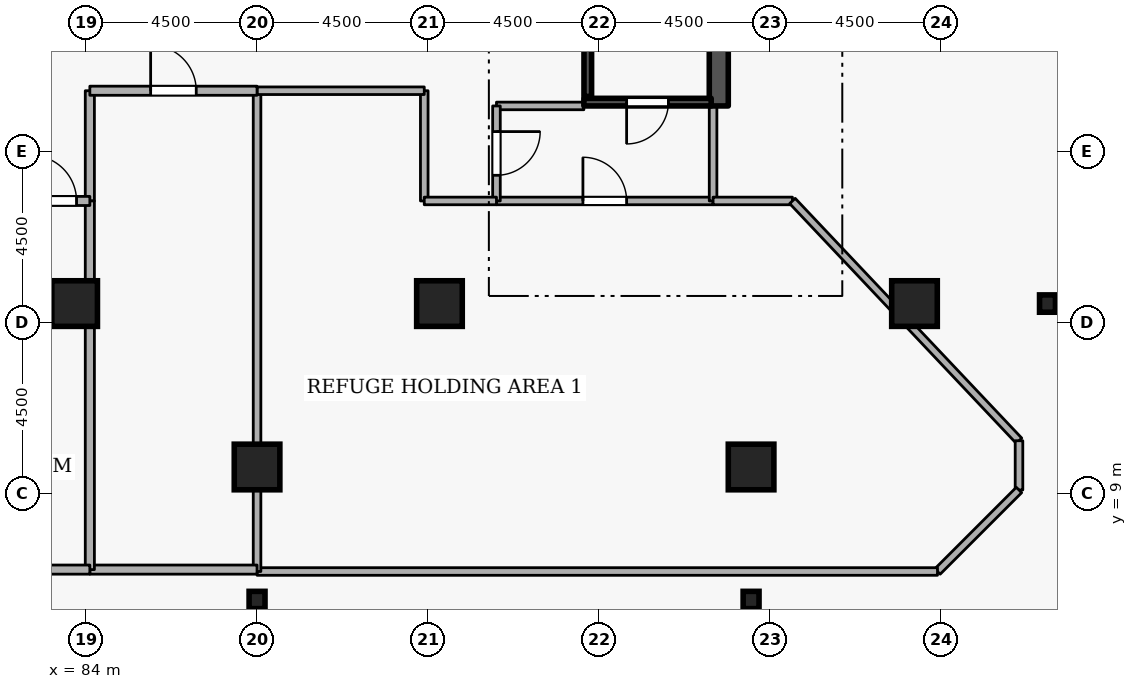
"""IFC4 building model, lengths in metres.
Left out: names, types, materials, properties, quantities, classifications, styles, units other than length and angle.
Written with IfcOpenShell. Run it as: python <this file> out.ifc"""

import sys

from ifc_helpers import new_model, si_unit, direction, frame, frame_2d, origin, origin_2d, place, context, subcontext, project, spatial, rectangle, i_section, extrude, element, fill, save


model = new_model("IFC4")
c1 = context("Model", 3, precision=1e-05, world=origin(), true_north=direction((0.0, 1.0)))
c2 = subcontext(c1, "Body", "Model", "MODEL_VIEW")
j1 = project(units=[si_unit("LENGTHUNIT", "METRE"), si_unit("PLANEANGLEUNIT", "RADIAN")], contexts=[c1])
p1 = place(None, origin())
s1 = spatial("IfcSite", under=j1, at=p1, CompositionType="ELEMENT")
p2 = place(p1, origin())
s2 = spatial("IfcBuilding", under=s1, at=p2, CompositionType="ELEMENT")
p3 = place(p2, frame((0.0, 0.0, 141.3)))
s3 = spatial("IfcBuildingStorey", under=s2, at=p3, CompositionType="ELEMENT", Elevation=141.3)
p4 = place(p3, frame((100.65, 19.2, 0.0), z_axis=(0.0, 0.0, 1.0), x_axis=(0.0, 1.0, 0.0)))
e1 = element("IfcWall", 1, at=p4, inside=s3, PredefinedType="SHEAR", context=c2, shape_type="SweptSolid", body=[
    extrude(rectangle(XDim=15.6, YDim=0.5, at=frame_2d((7.8, 0.0))), origin(), (0.0, 0.0, 1.0), 4.2),
])
for number, where, z_axis, x_axis in (
    (2, (105.8, 14.0, 0.0), (0.0, 0.0, 1.0), (1.0, 0.0, 0.0)),
    (3, (101.5, 9.7, 0.0), (0.0, 0.0, 1.0), (1.0, 0.0, 0.0)),
    (4, (88.5, 9.7, 0.0), (0.0, 0.0, 1.0), (1.0, 0.0, 0.0)),
    (5, (93.3, 14.0, 0.0), (0.0, 0.0, 1.0), (1.0, 0.0, 0.0)),
    (6, (83.7, 14.0, 0.0), (0.0, 0.0, 1.0), (1.0, 0.0, 0.0)),
):
    element("IfcColumn", number, at=place(p3, frame(where, z_axis=z_axis, x_axis=x_axis)), inside=s3, PredefinedType="COLUMN", context=c2, shape_type="SweptSolid", body=[
        extrude(rectangle(XDim=1.2, YDim=1.2, at=origin_2d()), origin(), (0.0, 0.0, 1.0), 4.2),
    ])
for number, where, z_axis, x_axis in (
    (7, (109.3, 14.0, 0.0), (0.0, 0.0, 1.0), (1.0, 0.0, 0.0)),
    (8, (101.5, 6.2, 0.0), (0.0, 0.0, 1.0), (1.0, 0.0, 0.0)),
    (9, (88.5, 6.2, 0.0), (0.0, 0.0, 1.0), (1.0, 0.0, 0.0)),
):
    element("IfcColumn", number, at=place(p3, frame(where, z_axis=z_axis, x_axis=x_axis)), inside=s3, PredefinedType="COLUMN", context=c2, shape_type="SweptSolid", body=[
        extrude(i_section(OverallWidth=0.418, OverallDepth=0.456, WebThickness=0.042, FlangeThickness=0.067, FilletRadius=0.015, at=origin_2d()), origin(), (0.0, 0.0, 1.0), 4.2),
    ])
p5 = place(p3, frame((100.45, 19.3, 0.0), z_axis=(0.0, 0.0, 1.0), x_axis=(-1.0, 0.0, 0.0)))
e10 = element("IfcWall", 10, at=p5, inside=s3, PredefinedType="SHEAR", context=c2, shape_type="SweptSolid", body=[
    extrude(rectangle(XDim=3.35, YDim=0.2, at=frame_2d((1.675, 0.0))), origin(), (0.0, 0.0, 1.0), 4.2),
])
p6 = place(p5, frame((1.125, 0.0, 0.0)))
e11 = element("IfcOpeningElement", 11, at=p6, cuts=e10, PredefinedType="OPENING", context=c2, shape_type="SweptSolid", body=[
    extrude(rectangle(XDim=1.1, YDim=2.1, at=frame_2d((0.55, 1.05))), frame((0.0, 0.11, 0.0), z_axis=(0.0, -1.0, 0.0), x_axis=(1.0, 0.0, 0.0)), (0.0, 0.0, 1.0), 0.22),
])
p7 = place(p3, frame((97.203, 26.55, 0.0), z_axis=(0.0, 0.0, 1.0), x_axis=(0.0, -1.0, 0.0)))
e12 = element("IfcWall", 12, at=p7, inside=s3, PredefinedType="SHEAR", context=c2, shape_type="SweptSolid", body=[
    extrude(rectangle(XDim=7.1, YDim=0.2, at=frame_2d((3.55, 0.0))), origin(), (0.0, 0.0, 1.0), 4.2),
])
p8 = place(p3, frame((94.8, 16.7, 0.0), z_axis=(0.0, 0.0, 1.0), x_axis=(1.0, 0.0, 0.0)))
e13 = element("IfcWall", 13, at=p8, inside=s3, PredefinedType="STANDARD", context=c2, shape_type="SweptSolid", body=[
    extrude(rectangle(XDim=5.7, YDim=0.2, at=frame_2d((2.85, 0.0))), origin(), (0.0, 0.0, 1.0), 3.94),
])
p9 = place(p8, frame((2.275, 0.0, 0.0)))
e14 = element("IfcOpeningElement", 14, at=p9, cuts=e13, PredefinedType="OPENING", context=c2, shape_type="SweptSolid", body=[
    extrude(rectangle(XDim=1.15, YDim=2.1, at=frame_2d((0.575, 1.05))), frame((0.0, 0.11, 0.0), z_axis=(0.0, -1.0, 0.0), x_axis=(1.0, 0.0, 0.0)), (0.0, 0.0, 1.0), 0.22),
])
p10 = place(p3, frame((100.5, 16.7, 0.0), z_axis=(0.0, 0.0, 1.0), x_axis=(0.0, 1.0, 0.0)))
e15 = element("IfcWall", 15, at=p10, inside=s3, PredefinedType="STANDARD", context=c2, shape_type="SweptSolid", body=[
    extrude(rectangle(XDim=2.5, YDim=0.2, at=frame_2d((1.25, 0.0))), origin(), (0.0, 0.0, 1.0), 3.94),
])
p11 = place(p3, frame((97.1, 19.2, 0.0), z_axis=(0.0, 0.0, 1.0), x_axis=(-1.0, 0.0, 0.0)))
e16 = element("IfcWall", 16, at=p11, inside=s3, PredefinedType="STANDARD", context=c2, shape_type="SweptSolid", body=[
    extrude(rectangle(XDim=2.3, YDim=0.2, at=frame_2d((1.15, 0.0))), origin(), (0.0, 0.0, 1.0), 3.145),
])
p12 = place(p3, frame((94.8, 19.2, 0.0), z_axis=(0.0, 0.0, 1.0), x_axis=(0.0, -1.0, 0.0)))
e17 = element("IfcWall", 17, at=p12, inside=s3, PredefinedType="STANDARD", context=c2, shape_type="SweptSolid", body=[
    extrude(rectangle(XDim=2.5, YDim=0.2, at=frame_2d((1.25, 0.0))), origin(), (0.0, 0.0, 1.0), 3.94),
])
p13 = place(p12, frame((0.675, 0.0, 0.0)))
e18 = element("IfcOpeningElement", 18, at=p13, cuts=e17, PredefinedType="OPENING", context=c2, shape_type="SweptSolid", body=[
    extrude(rectangle(XDim=1.15, YDim=2.1, at=frame_2d((0.575, 1.05))), frame((0.0, 0.11, 0.0), z_axis=(0.0, -1.0, 0.0), x_axis=(1.0, 0.0, 0.0)), (0.0, 0.0, 1.0), 0.22),
])
p14 = place(p3, frame((92.9, 19.6, 0.0), z_axis=(0.0, 0.0, 1.0), x_axis=(0.0, -1.0, 0.0)))
e19 = element("IfcWall", 19, at=p14, inside=s3, PredefinedType="STANDARD", context=c2, shape_type="SweptSolid", body=[
    extrude(rectangle(XDim=2.9, YDim=0.2, at=frame_2d((1.45, 0.0))), origin(), (0.0, 0.0, 1.0), 3.94),
])
p15 = place(p3, frame((92.9, 16.7, 0.0), z_axis=(0.0, 0.0, 1.0), x_axis=(1.0, 0.0, 0.0)))
e20 = element("IfcWall", 20, at=p15, inside=s3, PredefinedType="STANDARD", context=c2, shape_type="SweptSolid", body=[
    extrude(rectangle(XDim=1.9, YDim=0.2, at=frame_2d((0.95, 0.0))), origin(), (0.0, 0.0, 1.0), 3.94),
])
p16 = place(p3, frame((100.5, 16.7, 0.0), z_axis=(0.0, 0.0, 1.0), x_axis=(1.0, 0.0, 0.0)))
e21 = element("IfcWall", 21, at=p16, inside=s3, PredefinedType="STANDARD", context=c2, shape_type="SweptSolid", body=[
    extrude(rectangle(XDim=2.088, YDim=0.2, at=frame_2d((1.044, 0.0))), origin(), (0.0, 0.0, 1.0), 3.94),
])
p17 = place(p3, frame((102.588, 16.7, 0.0), z_axis=(0.0, 0.0, 1.0), x_axis=(0.68682667103, -0.726821246223, 0.0)))
e22 = element("IfcWall", 22, at=p17, inside=s3, PredefinedType="STANDARD", context=c2, shape_type="SweptSolid", body=[
    extrude(rectangle(XDim=8.68, YDim=0.2, at=frame_2d((4.34, 0.0))), origin(), (0.0, 0.0, 1.0), 3.94),
])
p18 = place(p3, frame((108.55, 10.391, 0.0), z_axis=(0.0, 0.0, 1.0), x_axis=(0.0, -1.0, 0.0)))
e23 = element("IfcWall", 23, at=p18, inside=s3, PredefinedType="STANDARD", context=c2, shape_type="SweptSolid", body=[
    extrude(rectangle(XDim=1.296, YDim=0.2, at=frame_2d((0.648, 0.0))), origin(), (0.0, 0.0, 1.0), 3.94),
])
p19 = place(p3, frame((108.55, 9.095, 0.0), z_axis=(0.0, 0.0, 1.0), x_axis=(-0.707106781187, -0.707106781187, 0.0)))
e24 = element("IfcWall", 24, at=p19, inside=s3, PredefinedType="STANDARD", context=c2, shape_type="SweptSolid", body=[
    extrude(rectangle(XDim=3.033, YDim=0.2, at=frame_2d((1.517, 0.0))), origin(), (0.0, 0.0, 1.0), 3.94),
])
p20 = place(p3, frame((106.405, 6.95, 0.0), z_axis=(0.0, 0.0, 1.0), x_axis=(-1.0, 0.0, 0.0)))
e25 = element("IfcWall", 25, at=p20, inside=s3, PredefinedType="STANDARD", context=c2, shape_type="SweptSolid", body=[
    extrude(rectangle(XDim=17.905, YDim=0.2, at=frame_2d((8.953, 0.0))), origin(), (0.0, 0.0, 1.0), 3.94),
])
p21 = place(p3, frame((88.5, 6.95, 0.0), z_axis=(0.0, 0.0, 1.0), x_axis=(0.0, 1.0, 0.0)))
e26 = element("IfcWall", 26, at=p21, inside=s3, PredefinedType="STANDARD", context=c2, shape_type="SweptSolid", body=[
    extrude(rectangle(XDim=12.65, YDim=0.2, at=frame_2d((6.325, 0.0))), origin(), (0.0, 0.0, 1.0), 3.325),
])
p22 = place(p3, frame((88.5, 19.6, 0.0), z_axis=(0.0, 0.0, 1.0), x_axis=(1.0, 0.0, 0.0)))
e27 = element("IfcWall", 27, at=p22, inside=s3, PredefinedType="STANDARD", context=c2, shape_type="SweptSolid", body=[
    extrude(rectangle(XDim=4.4, YDim=0.2, at=frame_2d((2.2, 0.0))), origin(), (0.0, 0.0, 1.0), 3.145),
])
p23 = place(p3, frame((84.1, 16.7, 0.0), z_axis=(0.0, 0.0, 1.0), x_axis=(0.0, 1.0, 0.0)))
e28 = element("IfcWall", 28, at=p23, inside=s3, PredefinedType="STANDARD", context=c2, shape_type="SweptSolid", body=[
    extrude(rectangle(XDim=2.9, YDim=0.24, at=frame_2d((1.45, 0.0))), origin(), (0.0, 0.0, 1.0), 3.94),
])
p24 = place(p3, frame((84.1, 19.6, 0.0), z_axis=(0.0, 0.0, 1.0), x_axis=(1.0, 0.0, 0.0)))
e29 = element("IfcWall", 29, at=p24, inside=s3, PredefinedType="STANDARD", context=c2, shape_type="SweptSolid", body=[
    extrude(rectangle(XDim=4.4, YDim=0.24, at=frame_2d((2.2, 0.0))), origin(), (0.0, 0.0, 1.0), 3.145),
])
p25 = place(p24, frame((1.6, 0.0, 0.0)))
e30 = element("IfcOpeningElement", 30, at=p25, cuts=e29, PredefinedType="OPENING", context=c2, shape_type="SweptSolid", body=[
    extrude(rectangle(XDim=1.2, YDim=2.1, at=frame_2d((0.6, 1.05))), frame((0.0, 0.13, 0.0), z_axis=(0.0, -1.0, 0.0), x_axis=(1.0, 0.0, 0.0)), (0.0, 0.0, 1.0), 0.26),
])
p26 = place(p3, frame((88.5, 7.0, 0.0), z_axis=(0.0, 0.0, 1.0), x_axis=(-1.0, 0.0, 0.0)))
e31 = element("IfcWall", 31, at=p26, inside=s3, PredefinedType="STANDARD", context=c2, shape_type="SweptSolid", body=[
    extrude(rectangle(XDim=4.4, YDim=0.24, at=frame_2d((2.2, 0.0))), origin(), (0.0, 0.0, 1.0), 3.94),
])
p27 = place(p3, frame((84.1, 7.0, 0.0), z_axis=(0.0, 0.0, 1.0), x_axis=(0.0, 1.0, 0.0)))
e32 = element("IfcWall", 32, at=p27, inside=s3, PredefinedType="STANDARD", context=c2, shape_type="SweptSolid", body=[
    extrude(rectangle(XDim=9.7, YDim=0.24, at=frame_2d((4.85, 0.0))), origin(), (0.0, 0.0, 1.0), 3.94),
])
p28 = place(p3, frame((82.2, 16.7, 0.0), z_axis=(0.0, 0.0, 1.0), x_axis=(1.0, 0.0, 0.0)))
e33 = element("IfcWall", 33, at=p28, inside=s3, PredefinedType="STANDARD", context=c2, shape_type="SweptSolid", body=[
    extrude(rectangle(XDim=1.9, YDim=0.24, at=frame_2d((0.95, 0.0))), origin(), (0.0, 0.0, 1.0), 3.94),
])
p29 = place(p28, frame((0.35, 0.0, 0.0)))
e34 = element("IfcOpeningElement", 34, at=p29, cuts=e33, PredefinedType="OPENING", context=c2, shape_type="SweptSolid", body=[
    extrude(rectangle(XDim=1.2, YDim=2.1, at=frame_2d((0.6, 1.05))), frame((0.0, 0.13, 0.0), z_axis=(0.0, -1.0, 0.0), x_axis=(1.0, 0.0, 0.0)), (0.0, 0.0, 1.0), 0.26),
])
p30 = place(p3, frame((84.1, 7.0, 0.0), z_axis=(0.0, 0.0, 1.0), x_axis=(-1.0, 0.0, 0.0)))
e35 = element("IfcWall", 35, at=p30, inside=s3, PredefinedType="STANDARD", context=c2, shape_type="SweptSolid", body=[
    extrude(rectangle(XDim=7.4, YDim=0.24, at=frame_2d((3.7, 0.0))), origin(), (0.0, 0.0, 1.0), 3.445),
])
p31 = place(p6, origin())
e36 = element("IfcDoor", 36, at=p31, inside=s3, OperationType="SINGLE_SWING_RIGHT", PredefinedType="DOOR", context=c2, shape_type="SweptSolid", body=[
    extrude(rectangle(XDim=1.1, YDim=2.1, at=frame_2d((0.55, 1.05))), frame((0.0, 0.025, 0.0), z_axis=(0.0, -1.0, 0.0), x_axis=(1.0, 0.0, 0.0)), (0.0, 0.0, 1.0), 0.05),
])
fill(e11, e36)
p32 = place(p13, origin())
e37 = element("IfcDoor", 37, at=p32, inside=s3, OperationType="SINGLE_SWING_LEFT", PredefinedType="DOOR", context=c2, shape_type="SweptSolid", body=[
    extrude(rectangle(XDim=1.15, YDim=2.1, at=frame_2d((0.575, 1.05))), frame((0.0, 0.025, 0.0), z_axis=(0.0, -1.0, 0.0), x_axis=(1.0, 0.0, 0.0)), (0.0, 0.0, 1.0), 0.05),
])
fill(e18, e37)
p33 = place(p9, origin())
e38 = element("IfcDoor", 38, at=p33, inside=s3, OperationType="SINGLE_SWING_LEFT", PredefinedType="DOOR", context=c2, shape_type="SweptSolid", body=[
    extrude(rectangle(XDim=1.15, YDim=2.1, at=frame_2d((0.575, 1.05))), frame((0.0, 0.025, 0.0), z_axis=(0.0, -1.0, 0.0), x_axis=(1.0, 0.0, 0.0)), (0.0, 0.0, 1.0), 0.05),
])
fill(e14, e38)
p34 = place(p25, origin())
e39 = element("IfcDoor", 39, at=p34, inside=s3, OperationType="SINGLE_SWING_LEFT", PredefinedType="DOOR", context=c2, shape_type="SweptSolid", body=[
    extrude(rectangle(XDim=1.2, YDim=2.1, at=frame_2d((0.6, 1.05))), frame((0.0, 0.025, 0.0), z_axis=(0.0, -1.0, 0.0), x_axis=(1.0, 0.0, 0.0)), (0.0, 0.0, 1.0), 0.05),
])
fill(e30, e39)
p35 = place(p29, origin())
e40 = element("IfcDoor", 40, at=p35, inside=s3, OperationType="SINGLE_SWING_LEFT", PredefinedType="DOOR", context=c2, shape_type="SweptSolid", body=[
    extrude(rectangle(XDim=1.2, YDim=2.1, at=frame_2d((0.6, 1.05))), frame((0.0, 0.025, 0.0), z_axis=(0.0, -1.0, 0.0), x_axis=(1.0, 0.0, 0.0)), (0.0, 0.0, 1.0), 0.05),
])
fill(e34, e40)
save(model, sys.argv[1])
